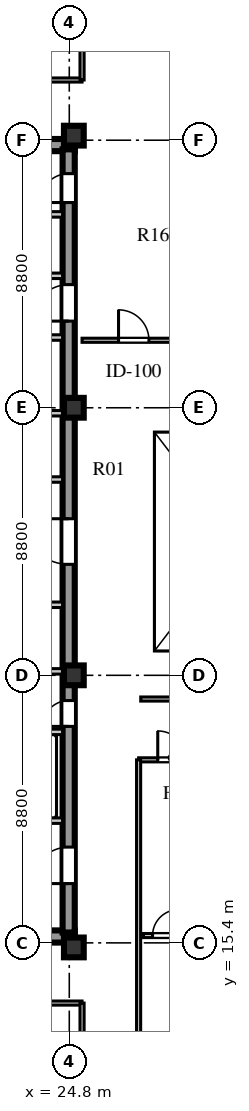
"""IFC4 building model, lengths in metres.
Left out: names, types, materials, properties, quantities, classifications, styles, units other than length and angle.
Written with IfcOpenShell. Run it as: python <this file> out.ifc"""

import sys

from ifc_helpers import new_model, si_unit, direction, frame, frame_2d, origin, origin_2d, place, context, subcontext, project, spatial, rectangle, extrude, element, fill, save


model = new_model("IFC4")
c1 = context("Model", 3, precision=1e-05, world=origin(), true_north=direction((0.0, 1.0)))
c2 = subcontext(c1, "Body", "Model", "MODEL_VIEW")
j1 = project(units=[si_unit("LENGTHUNIT", "METRE"), si_unit("PLANEANGLEUNIT", "RADIAN")], contexts=[c1])
p1 = place(None, origin())
s1 = spatial("IfcSite", under=j1, at=p1, CompositionType="ELEMENT")
p2 = place(p1, origin())
s2 = spatial("IfcBuilding", under=s1, at=p2, CompositionType="ELEMENT")
p3 = place(p2, frame((0.0, 0.0, 296.0)))
s3 = spatial("IfcBuildingStorey", under=s2, at=p3, CompositionType="ELEMENT", Elevation=296.0)
for number, where, z_axis, x_axis in (
    (1, (15.5, 15.61, 0.0), (0.0, 0.0, 1.0), (1.0, 0.0, 0.0)),
    (2, (15.5, 41.64, 0.0), (0.0, 0.0, 1.0), (1.0, 0.0, 0.0)),
):
    element("IfcWall", number, at=place(p3, frame(where, z_axis=z_axis, x_axis=x_axis)), inside=s3, PredefinedType="SHEAR", context=c2, shape_type="SweptSolid", body=[
        extrude(rectangle(XDim=9.48, YDim=0.4, at=frame_2d((4.74, 0.0))), origin(), (0.0, 0.0, 1.0), 3.66),
    ])
p4 = place(p3, frame((24.78, 15.74, 0.0), z_axis=(0.0, 0.0, 1.0), x_axis=(0.0, 1.0, 0.0)))
e3 = element("IfcWall", 3, at=p4, inside=s3, PredefinedType="SHEAR", context=c2, shape_type="SweptSolid", body=[
    extrude(rectangle(XDim=25.76, YDim=0.4, at=frame_2d((12.88, 0.0))), origin(), (0.0, 0.0, 1.0), 3.66),
])
p5 = place(p4, frame((1.61, 0.0, 0.0)))
e4 = element("IfcOpeningElement", 4, at=p5, cuts=e3, PredefinedType="OPENING", context=c2, shape_type="SweptSolid", body=[
    extrude(rectangle(XDim=1.2, YDim=2.1, at=frame_2d((0.6, 1.05))), frame((0.0, 0.21, 0.0), z_axis=(0.0, -1.0, 0.0), x_axis=(1.0, 0.0, 0.0)), (0.0, 0.0, 1.0), 0.42),
])
p6 = place(p4, frame((6.78, 0.0, 0.0)))
e5 = element("IfcOpeningElement", 5, at=p6, cuts=e3, PredefinedType="OPENING", context=c2, shape_type="SweptSolid", body=[
    extrude(rectangle(XDim=0.85, YDim=2.06, at=frame_2d((0.425, 1.03))), frame((0.0, 0.21, 0.0), z_axis=(0.0, -1.0, 0.0), x_axis=(1.0, 0.0, 0.0)), (0.0, 0.0, 1.0), 0.42),
])
p7 = place(p4, frame((12.11, 0.0, 0.0)))
e6 = element("IfcOpeningElement", 6, at=p7, cuts=e3, PredefinedType="OPENING", context=c2, shape_type="SweptSolid", body=[
    extrude(rectangle(XDim=1.5, YDim=2.12, at=frame_2d((0.75, 1.06))), frame((0.0, 0.21, 0.0), z_axis=(0.0, -1.0, 0.0), x_axis=(1.0, 0.0, 0.0)), (0.0, 0.0, 1.0), 0.42),
])
p8 = place(p4, frame((20.11, 0.0, 0.0)))
e7 = element("IfcOpeningElement", 7, at=p8, cuts=e3, PredefinedType="OPENING", context=c2, shape_type="SweptSolid", body=[
    extrude(rectangle(XDim=1.2, YDim=2.12, at=frame_2d((0.6, 1.06))), frame((0.0, 0.21, 0.0), z_axis=(0.0, -1.0, 0.0), x_axis=(1.0, 0.0, 0.0)), (0.0, 0.0, 1.0), 0.42),
])
p9 = place(p4, frame((24.01, 0.0, 0.0)))
e8 = element("IfcOpeningElement", 8, at=p9, cuts=e3, PredefinedType="OPENING", context=c2, shape_type="SweptSolid", body=[
    extrude(rectangle(XDim=0.95, YDim=2.1, at=frame_2d((0.475, 1.05))), frame((0.0, 0.21, 0.0), z_axis=(0.0, -1.0, 0.0), x_axis=(1.0, 0.0, 0.0)), (0.0, 0.0, 1.0), 0.42),
])
for number, where, z_axis, x_axis in (
    (9, (24.95, 15.25, 0.0), (0.0, 0.0, 1.0), (1.0, 0.0, 0.0)),
    (10, (24.95, 24.2, 0.0), (0.0, 0.0, 1.0), (1.0, 0.0, 0.0)),
    (11, (24.95, 33.0, 0.0), (0.0, 0.0, 1.0), (1.0, 0.0, 0.0)),
    (12, (24.95, 41.95, 0.0), (0.0, 0.0, 1.0), (1.0, 0.0, 0.0)),
):
    element("IfcColumn", number, at=place(p3, frame(where, z_axis=z_axis, x_axis=x_axis)), inside=s3, PredefinedType="COLUMN", context=c2, shape_type="SweptSolid", body=[
        extrude(rectangle(XDim=0.65, YDim=0.65, at=origin_2d()), origin(), (0.0, 0.0, 1.0), 3.66),
    ])
p10 = place(p3, frame((19.64, 19.42, 0.0), z_axis=(0.0, 0.0, 1.0), x_axis=(1.0, 0.0, 0.0)))
e13 = element("IfcWall", 13, at=p10, inside=s3, PredefinedType="SOLIDWALL", context=c2, shape_type="SweptSolid", body=[
    extrude(rectangle(XDim=4.94, YDim=0.18, at=frame_2d((2.47, 0.0))), origin(), (0.0, 0.0, 1.0), 3.66),
])
p11 = place(p10, frame((0.72, 0.0, 0.0)))
e14 = element("IfcOpeningElement", 14, at=p11, cuts=e13, PredefinedType="OPENING", context=c2, shape_type="SweptSolid", body=[
    extrude(rectangle(XDim=1.1, YDim=2.1, at=frame_2d((0.55, 1.05))), frame((0.0, 0.1, 0.0), z_axis=(0.0, -1.0, 0.0), x_axis=(1.0, 0.0, 0.0)), (0.0, 0.0, 1.0), 0.2),
])
p12 = place(p10, frame((3.02, 0.0, 0.0)))
e15 = element("IfcOpeningElement", 15, at=p12, cuts=e13, PredefinedType="OPENING", context=c2, shape_type="SweptSolid", body=[
    extrude(rectangle(XDim=1.1, YDim=2.1, at=frame_2d((0.55, 1.05))), frame((0.0, 0.1, 0.0), z_axis=(0.0, -1.0, 0.0), x_axis=(1.0, 0.0, 0.0)), (0.0, 0.0, 1.0), 0.2),
])
p13 = place(p3, frame((19.64, 22.34, 0.0), z_axis=(0.0, 0.0, 1.0), x_axis=(1.0, 0.0, 0.0)))
e16 = element("IfcWall", 16, at=p13, inside=s3, PredefinedType="SOLIDWALL", context=c2, shape_type="SweptSolid", body=[
    extrude(rectangle(XDim=4.94, YDim=0.18, at=frame_2d((2.47, 0.0))), origin(), (0.0, 0.0, 1.0), 3.66),
])
p14 = place(p3, frame((15.9, 26.52, 0.0), z_axis=(0.0, 0.0, 1.0), x_axis=(1.0, 0.0, 0.0)))
e17 = element("IfcWall", 17, at=p14, inside=s3, PredefinedType="SOLIDWALL", context=c2, shape_type="SweptSolid", body=[
    extrude(rectangle(XDim=8.68, YDim=0.18, at=frame_2d((4.34, 0.0))), origin(), (0.0, 0.0, 1.0), 3.66),
])
p15 = place(p14, frame((2.5, 0.0, 0.0)))
e18 = element("IfcOpeningElement", 18, at=p15, cuts=e17, PredefinedType="OPENING", context=c2, shape_type="SweptSolid", body=[
    extrude(rectangle(XDim=0.95, YDim=2.1, at=frame_2d((0.475, 1.05))), frame((0.0, 0.1, 0.0), z_axis=(0.0, -1.0, 0.0), x_axis=(1.0, 0.0, 0.0)), (0.0, 0.0, 1.0), 0.2),
])
p16 = place(p14, frame((6.0, 0.0, 0.0)))
e19 = element("IfcOpeningElement", 19, at=p16, cuts=e17, PredefinedType="OPENING", context=c2, shape_type="SweptSolid", body=[
    extrude(rectangle(XDim=0.95, YDim=2.1, at=frame_2d((0.475, 1.05))), frame((0.0, 0.1, 0.0), z_axis=(0.0, -1.0, 0.0), x_axis=(1.0, 0.0, 0.0)), (0.0, 0.0, 1.0), 0.2),
])
p17 = place(p3, frame((15.9, 24.33, 0.0), z_axis=(0.0, 0.0, 1.0), x_axis=(1.0, 0.0, 0.0)))
e20 = element("IfcWall", 20, at=p17, inside=s3, PredefinedType="SOLIDWALL", context=c2, shape_type="SweptSolid", body=[
    extrude(rectangle(XDim=8.68, YDim=0.18, at=frame_2d((4.34, 0.0))), origin(), (0.0, 0.0, 1.0), 3.06),
])
p18 = place(p3, frame((15.9, 30.64, 0.0), z_axis=(0.0, 0.0, 1.0), x_axis=(1.0, 0.0, 0.0)))
e21 = element("IfcWall", 21, at=p18, inside=s3, PredefinedType="SOLIDWALL", context=c2, shape_type="SweptSolid", body=[
    extrude(rectangle(XDim=8.68, YDim=0.18, at=frame_2d((4.34, 0.0))), origin(), (0.0, 0.0, 1.0), 3.66),
])
p19 = place(p18, frame((3.7, 0.0, 0.0)))
e22 = element("IfcOpeningElement", 22, at=p19, cuts=e21, PredefinedType="OPENING", context=c2, shape_type="SweptSolid", body=[
    extrude(rectangle(XDim=0.95, YDim=2.1, at=frame_2d((0.475, 1.05))), frame((0.0, 0.1, 0.0), z_axis=(0.0, -1.0, 0.0), x_axis=(1.0, 0.0, 0.0)), (0.0, 0.0, 1.0), 0.2),
])
p20 = place(p3, frame((15.9, 32.82, 0.0), z_axis=(0.0, 0.0, 1.0), x_axis=(1.0, 0.0, 0.0)))
e23 = element("IfcWall", 23, at=p20, inside=s3, PredefinedType="SOLIDWALL", context=c2, shape_type="SweptSolid", body=[
    extrude(rectangle(XDim=8.68, YDim=0.18, at=frame_2d((4.34, 0.0))), origin(), (0.0, 0.0, 1.0), 3.06),
])
p21 = place(p3, frame((22.02, 35.31, 0.0), z_axis=(0.0, 0.0, 1.0), x_axis=(1.0, 0.0, 0.0)))
e24 = element("IfcWall", 24, at=p21, inside=s3, PredefinedType="SOLIDWALL", context=c2, shape_type="SweptSolid", body=[
    extrude(rectangle(XDim=2.56, YDim=0.18, at=frame_2d((1.28, 0.0))), origin(), (0.0, 0.0, 1.0), 3.66),
])
p22 = place(p21, frame((0.55, 0.0, 0.0)))
e25 = element("IfcOpeningElement", 25, at=p22, cuts=e24, PredefinedType="OPENING", context=c2, shape_type="SweptSolid", body=[
    extrude(rectangle(XDim=1.0, YDim=2.1, at=frame_2d((0.5, 1.05))), frame((0.0, 0.1, 0.0), z_axis=(0.0, -1.0, 0.0), x_axis=(1.0, 0.0, 0.0)), (0.0, 0.0, 1.0), 0.2),
])
p23 = place(p3, frame((19.64, 37.34, 0.0), z_axis=(0.0, 0.0, 1.0), x_axis=(1.0, 0.0, 0.0)))
e26 = element("IfcWall", 26, at=p23, inside=s3, PredefinedType="SOLIDWALL", context=c2, shape_type="SweptSolid", body=[
    extrude(rectangle(XDim=4.94, YDim=0.18, at=frame_2d((2.47, 0.0))), origin(), (0.0, 0.0, 1.0), 3.66),
])
p24 = place(p23, frame((0.45, 0.0, 0.0)))
e27 = element("IfcOpeningElement", 27, at=p24, cuts=e26, PredefinedType="OPENING", context=c2, shape_type="SweptSolid", body=[
    extrude(rectangle(XDim=1.0, YDim=2.1, at=frame_2d((0.5, 1.05))), frame((0.0, 0.1, 0.0), z_axis=(0.0, -1.0, 0.0), x_axis=(1.0, 0.0, 0.0)), (0.0, 0.0, 1.0), 0.2),
])
p25 = place(p23, frame((2.5, 0.0, 0.0)))
e28 = element("IfcOpeningElement", 28, at=p25, cuts=e26, PredefinedType="OPENING", context=c2, shape_type="SweptSolid", body=[
    extrude(rectangle(XDim=1.0, YDim=2.1, at=frame_2d((0.5, 1.05))), frame((0.0, 0.1, 0.0), z_axis=(0.0, -1.0, 0.0), x_axis=(1.0, 0.0, 0.0)), (0.0, 0.0, 1.0), 0.2),
])
p26 = place(p3, frame((19.64, 39.36, 0.0), z_axis=(0.0, 0.0, 1.0), x_axis=(1.0, 0.0, 0.0)))
e29 = element("IfcWall", 29, at=p26, inside=s3, PredefinedType="SOLIDWALL", context=c2, shape_type="SweptSolid", body=[
    extrude(rectangle(XDim=4.94, YDim=0.18, at=frame_2d((2.47, 0.0))), origin(), (0.0, 0.0, 1.0), 3.66),
])
p27 = place(p3, frame((27.08, 21.42, 0.0), z_axis=(0.0, 0.0, 1.0), x_axis=(1.0, 0.0, 0.0)))
e30 = element("IfcWall", 30, at=p27, inside=s3, PredefinedType="PARTITIONING", context=c2, shape_type="SweptSolid", body=[
    extrude(rectangle(XDim=12.07, YDim=0.135, at=frame_2d((6.035, 0.0))), origin(), (0.0, 0.0, 1.0), 3.36),
])
p28 = place(p27, frame((0.63, 0.0, 0.0)))
e31 = element("IfcOpeningElement", 31, at=p28, cuts=e30, PredefinedType="OPENING", context=c2, shape_type="SweptSolid", body=[
    extrude(rectangle(XDim=0.95, YDim=2.1, at=frame_2d((0.475, 1.05))), frame((0.0, 0.078, 0.0), z_axis=(0.0, -1.0, 0.0), x_axis=(1.0, 0.0, 0.0)), (0.0, 0.0, 1.0), 0.155),
])
p29 = place(p3, frame((27.08, 10.38, 0.0), z_axis=(0.0, 0.0, 1.0), x_axis=(0.0, 1.0, 0.0)))
e32 = element("IfcWall", 32, at=p29, inside=s3, PredefinedType="PARTITIONING", context=c2, shape_type="SweptSolid", body=[
    extrude(rectangle(XDim=11.04, YDim=0.135, at=frame_2d((5.52, 0.0))), origin(), (0.0, 0.0, 1.0), 3.66),
])
p30 = place(p3, frame((27.15, 23.42, 0.0), z_axis=(0.0, 0.0, 1.0), x_axis=(1.0, 0.0, 0.0)))
e33 = element("IfcWall", 33, at=p30, inside=s3, PredefinedType="PARTITIONING", context=c2, shape_type="SweptSolid", body=[
    extrude(rectangle(XDim=6.0, YDim=0.135, at=frame_2d((3.0, 0.0))), origin(), (0.0, 0.0, 1.0), 3.66),
])
p31 = place(p3, frame((25.22, 35.22, 0.0), z_axis=(0.0, 0.0, 1.0), x_axis=(1.0, 0.0, 0.0)))
e34 = element("IfcWall", 34, at=p31, inside=s3, PredefinedType="PARTITIONING", context=c2, shape_type="SweptSolid", body=[
    extrude(rectangle(XDim=9.5, YDim=0.135, at=frame_2d((4.75, 0.0))), origin(), (0.0, 0.0, 1.0), 3.66),
])
p32 = place(p31, frame((1.2, 0.0, 0.0)))
e35 = element("IfcOpeningElement", 35, at=p32, cuts=e34, PredefinedType="OPENING", context=c2, shape_type="SweptSolid", body=[
    extrude(rectangle(XDim=1.0, YDim=2.08, at=frame_2d((0.5, 1.04))), frame((0.0, 0.078, 0.0), z_axis=(0.0, -1.0, 0.0), x_axis=(1.0, 0.0, 0.0)), (0.0, 0.0, 1.0), 0.155),
])
p33 = place(p31, frame((6.2, 0.0, 0.0)))
e36 = element("IfcOpeningElement", 36, at=p33, cuts=e34, PredefinedType="OPENING", context=c2, shape_type="SweptSolid", body=[
    extrude(rectangle(XDim=0.9, YDim=2.08, at=frame_2d((0.45, 1.04))), frame((0.0, 0.078, 0.0), z_axis=(0.0, -1.0, 0.0), x_axis=(1.0, 0.0, 0.0)), (0.0, 0.0, 1.0), 0.155),
])
p34 = place(p3, frame((13.8, 13.42, 0.0), z_axis=(0.0, 0.0, 1.0), x_axis=(1.0, 0.0, 0.0)))
e37 = element("IfcWall", 37, at=p34, inside=s3, PredefinedType="PARTITIONING", context=c2, shape_type="SweptSolid", body=[
    extrude(rectangle(XDim=11.42, YDim=0.135, at=frame_2d((5.71, 0.0))), origin(), (0.0, 0.0, 1.0), 3.66),
])
p35 = place(p34, frame((3.2, 0.0, 0.0)))
e38 = element("IfcOpeningElement", 38, at=p35, cuts=e37, PredefinedType="OPENING", context=c2, shape_type="SweptSolid", body=[
    extrude(rectangle(XDim=0.95, YDim=2.08, at=frame_2d((0.475, 1.04))), frame((0.0, 0.078, 0.0), z_axis=(0.0, -1.0, 0.0), x_axis=(1.0, 0.0, 0.0)), (0.0, 0.0, 1.0), 0.155),
])
p36 = place(p3, frame((25.22, 10.38, 0.0), z_axis=(0.0, 0.0, 1.0), x_axis=(0.0, 1.0, 0.0)))
e39 = element("IfcWall", 39, at=p36, inside=s3, PredefinedType="PARTITIONING", context=c2, shape_type="SweptSolid", body=[
    extrude(rectangle(XDim=3.04, YDim=0.135, at=frame_2d((1.52, 0.0))), origin(), (0.0, 0.0, 1.0), 3.21),
])
p37 = place(p3, frame((13.8, 43.78, 0.0), z_axis=(0.0, 0.0, 1.0), x_axis=(1.0, 0.0, 0.0)))
e40 = element("IfcWall", 40, at=p37, inside=s3, PredefinedType="PARTITIONING", context=c2, shape_type="SweptSolid", body=[
    extrude(rectangle(XDim=11.42, YDim=0.135, at=frame_2d((5.71, 0.0))), origin(), (0.0, 0.0, 1.0), 3.66),
])
p38 = place(p37, frame((3.2, 0.0, 0.0)))
e41 = element("IfcOpeningElement", 41, at=p38, cuts=e40, PredefinedType="OPENING", context=c2, shape_type="SweptSolid", body=[
    extrude(rectangle(XDim=0.95, YDim=2.08, at=frame_2d((0.475, 1.04))), frame((0.0, 0.078, 0.0), z_axis=(0.0, -1.0, 0.0), x_axis=(1.0, 0.0, 0.0)), (0.0, 0.0, 1.0), 0.155),
])
p39 = place(p3, frame((25.22, 43.78, 0.0), z_axis=(0.0, 0.0, 1.0), x_axis=(0.0, 1.0, 0.0)))
e42 = element("IfcWall", 42, at=p39, inside=s3, PredefinedType="PARTITIONING", context=c2, shape_type="SweptSolid", body=[
    extrude(rectangle(XDim=3.04, YDim=0.135, at=frame_2d((1.52, 0.0))), origin(), (0.0, 0.0, 1.0), 3.21),
])
p40 = place(p3, frame((27.24, 15.641, 0.0), z_axis=(0.0, 0.0, 1.0), x_axis=(1.0, 0.0, 0.0)))
e43 = element("IfcWall", 43, at=p40, inside=s3, PredefinedType="PARTITIONING", context=c2, shape_type="SweptSolid", body=[
    extrude(rectangle(XDim=11.83, YDim=0.135, at=frame_2d((5.915, 0.0))), origin(), (0.0, 0.0, 1.0), 3.66),
])
p41 = place(p40, frame((0.3, 0.0, 0.0)))
e44 = element("IfcOpeningElement", 44, at=p41, cuts=e43, PredefinedType="OPENING", context=c2, shape_type="SweptSolid", body=[
    extrude(rectangle(XDim=0.85, YDim=2.08, at=frame_2d((0.425, 1.04))), frame((0.0, 0.078, 0.0), z_axis=(0.0, -1.0, 0.0), x_axis=(1.0, 0.0, 0.0)), (0.0, 0.0, 1.0), 0.155),
])
p42 = place(p40, frame((4.475, 0.0, 0.0)))
e45 = element("IfcOpeningElement", 45, at=p42, cuts=e43, PredefinedType="OPENING", context=c2, shape_type="SweptSolid", body=[
    extrude(rectangle(XDim=0.85, YDim=2.08, at=frame_2d((0.425, 1.04))), frame((0.0, 0.078, 0.0), z_axis=(0.0, -1.0, 0.0), x_axis=(1.0, 0.0, 0.0)), (0.0, 0.0, 1.0), 0.155),
])
p43 = place(p5, frame((1.2, 0.0, 0.0), z_axis=(0.0, 0.0, 1.0), x_axis=(-1.0, 0.0, 0.0)))
e46 = element("IfcDoor", 46, at=p43, inside=s3, OperationType="SINGLE_SWING_RIGHT", PredefinedType="DOOR", context=c2, shape_type="SweptSolid", body=[
    extrude(rectangle(XDim=1.2, YDim=2.1, at=frame_2d((0.6, 1.05))), frame((0.0, 0.025, 0.0), z_axis=(0.0, -1.0, 0.0), x_axis=(1.0, 0.0, 0.0)), (0.0, 0.0, 1.0), 0.05),
])
fill(e4, e46)
p44 = place(p6, frame((0.85, 0.0, 0.0), z_axis=(0.0, 0.0, 1.0), x_axis=(-1.0, 0.0, 0.0)))
e47 = element("IfcDoor", 47, at=p44, inside=s3, OperationType="SINGLE_SWING_RIGHT", PredefinedType="DOOR", context=c2, shape_type="SweptSolid", body=[
    extrude(rectangle(XDim=0.85, YDim=2.06, at=frame_2d((0.425, 1.03))), frame((0.0, 0.025, 0.0), z_axis=(0.0, -1.0, 0.0), x_axis=(1.0, 0.0, 0.0)), (0.0, 0.0, 1.0), 0.05),
])
fill(e5, e47)
p45 = place(p7, frame((1.5, 0.0, 0.0), z_axis=(0.0, 0.0, 1.0), x_axis=(-1.0, 0.0, 0.0)))
e48 = element("IfcDoor", 48, at=p45, inside=s3, OperationType="SINGLE_SWING_LEFT", PredefinedType="DOOR", context=c2, shape_type="SweptSolid", body=[
    extrude(rectangle(XDim=1.5, YDim=2.12, at=frame_2d((0.75, 1.06))), frame((0.0, 0.025, 0.0), z_axis=(0.0, -1.0, 0.0), x_axis=(1.0, 0.0, 0.0)), (0.0, 0.0, 1.0), 0.05),
])
fill(e6, e48)
p46 = place(p8, frame((1.2, 0.0, 0.0), z_axis=(0.0, 0.0, 1.0), x_axis=(-1.0, 0.0, 0.0)))
e49 = element("IfcDoor", 49, at=p46, inside=s3, OperationType="SINGLE_SWING_RIGHT", PredefinedType="DOOR", context=c2, shape_type="SweptSolid", body=[
    extrude(rectangle(XDim=1.2, YDim=2.12, at=frame_2d((0.6, 1.06))), frame((0.0, 0.025, 0.0), z_axis=(0.0, -1.0, 0.0), x_axis=(1.0, 0.0, 0.0)), (0.0, 0.0, 1.0), 0.05),
])
fill(e7, e49)
p47 = place(p9, frame((0.95, 0.0, 0.0), z_axis=(0.0, 0.0, 1.0), x_axis=(-1.0, 0.0, 0.0)))
e50 = element("IfcDoor", 50, at=p47, inside=s3, OperationType="SINGLE_SWING_RIGHT", PredefinedType="DOOR", context=c2, shape_type="SweptSolid", body=[
    extrude(rectangle(XDim=0.95, YDim=2.1, at=frame_2d((0.475, 1.05))), frame((0.0, 0.025, 0.0), z_axis=(0.0, -1.0, 0.0), x_axis=(1.0, 0.0, 0.0)), (0.0, 0.0, 1.0), 0.05),
])
fill(e8, e50)
p48 = place(p41, frame((0.85, 0.0, 0.0), z_axis=(0.0, 0.0, 1.0), x_axis=(-1.0, 0.0, 0.0)))
e51 = element("IfcDoor", 51, at=p48, inside=s3, OperationType="SINGLE_SWING_LEFT", PredefinedType="DOOR", context=c2, shape_type="SweptSolid", body=[
    extrude(rectangle(XDim=0.85, YDim=2.08, at=frame_2d((0.425, 1.04))), frame((0.0, 0.025, 0.0), z_axis=(0.0, -1.0, 0.0), x_axis=(1.0, 0.0, 0.0)), (0.0, 0.0, 1.0), 0.05),
])
fill(e44, e51)
p49 = place(p28, frame((0.95, 0.0, 0.0), z_axis=(0.0, 0.0, 1.0), x_axis=(-1.0, 0.0, 0.0)))
e52 = element("IfcDoor", 52, at=p49, inside=s3, OperationType="SINGLE_SWING_RIGHT", PredefinedType="DOOR", context=c2, shape_type="SweptSolid", body=[
    extrude(rectangle(XDim=0.95, YDim=2.1, at=frame_2d((0.475, 1.05))), frame((0.0, 0.025, 0.0), z_axis=(0.0, -1.0, 0.0), x_axis=(1.0, 0.0, 0.0)), (0.0, 0.0, 1.0), 0.05),
])
fill(e31, e52)
p50 = place(p32, origin())
e53 = element("IfcDoor", 53, at=p50, inside=s3, OperationType="SINGLE_SWING_LEFT", PredefinedType="DOOR", context=c2, shape_type="SweptSolid", body=[
    extrude(rectangle(XDim=1.0, YDim=2.08, at=frame_2d((0.5, 1.04))), frame((0.0, 0.025, 0.0), z_axis=(0.0, -1.0, 0.0), x_axis=(1.0, 0.0, 0.0)), (0.0, 0.0, 1.0), 0.05),
])
fill(e35, e53)
save(model, sys.argv[1])
